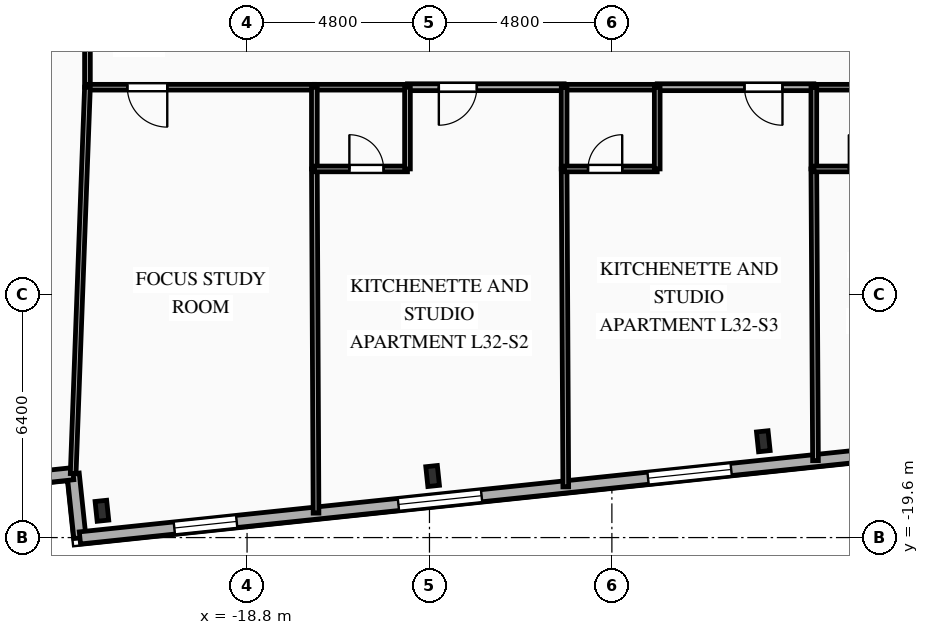
"""IFC4 building model, lengths in metres.
Left out: names, types, materials, properties, quantities, classifications, styles, units other than length and angle.
Written with IfcOpenShell. Run it as: python <this file> out.ifc"""

import sys

from ifc_helpers import new_model, si_unit, direction, frame, frame_2d, origin, origin_2d, place, context, subcontext, project, spatial, rectangle, i_section, extrude, element, fill, save


model = new_model("IFC4")
c1 = context("Model", 3, precision=1e-05, world=origin(), true_north=direction((0.0, 1.0)))
c2 = subcontext(c1, "Body", "Model", "MODEL_VIEW")
j1 = project(units=[si_unit("LENGTHUNIT", "METRE"), si_unit("PLANEANGLEUNIT", "RADIAN")], contexts=[c1])
p1 = place(None, origin())
s1 = spatial("IfcSite", under=j1, at=p1, CompositionType="ELEMENT")
p2 = place(p1, origin())
s2 = spatial("IfcBuilding", under=s1, at=p2, CompositionType="ELEMENT")
p3 = place(p2, frame((0.0, 0.0, 115.85)))
s3 = spatial("IfcBuildingStorey", under=s2, at=p3, CompositionType="ELEMENT", Elevation=115.85)
for number, where, z_axis, x_axis in (
    (1, (-22.619, -18.895, 0.0), (0.0, 0.0, 1.0), (0.995, 0.105, 0.0)),
    (2, (-13.917, -17.98, 0.0), (0.0, 0.0, 1.0), (0.995, 0.105, 0.0)),
    (3, (-5.215, -17.066, 0.0), (0.0, 0.0, 1.0), (0.995, 0.105, 0.0)),
):
    element("IfcColumn", number, at=place(p3, frame(where, z_axis=z_axis, x_axis=x_axis)), inside=s3, PredefinedType="COLUMN", context=c2, shape_type="SweptSolid", body=[
        extrude(i_section(OverallWidth=0.306, OverallDepth=0.524, WebThickness=0.021, FlangeThickness=0.04, FilletRadius=0.027, at=origin_2d()), origin(), (0.0, 0.0, 1.0), 3.35),
    ])
for number, where, z_axis, x_axis in (
    (4, (-23.198, -19.609, 0.0), (0.0, 0.0, 1.0), (-0.105, 0.995, 0.0)),
    (5, (-23.376, -17.919, 0.0), (0.0, 0.0, 1.0), (-0.995, -0.105, 0.0)),
):
    element("IfcWall", number, at=place(p3, frame(where, z_axis=z_axis, x_axis=x_axis)), inside=s3, PredefinedType="SOLIDWALL", context=c2, shape_type="SweptSolid", body=[
        extrude(rectangle(XDim=1.7, YDim=0.32, at=frame_2d((0.85, 0.0))), origin(), (0.0, 0.0, 1.0), 3.045),
    ])
p4 = place(p3, frame((30.307, -13.986, 0.0), z_axis=(0.0, 0.0, 1.0), x_axis=(-0.994521628355, -0.104531003701, 0.0)))
e6 = element("IfcWall", 6, at=p4, inside=s3, PredefinedType="SOLIDWALL", context=c2, shape_type="SweptSolid", body=[
    extrude(rectangle(XDim=53.8, YDim=0.32, at=frame_2d((26.9, 0.0))), origin(), (0.0, 0.0, 1.0), 3.045),
])
p5 = place(p4, frame((3.098, 0.0, 0.85)))
e7 = element("IfcOpeningElement", 7, at=p5, cuts=e6, PredefinedType="OPENING", context=c2, shape_type="SweptSolid", body=[
    extrude(rectangle(XDim=1.65, YDim=1.85, at=frame_2d((0.825, 0.925))), frame((0.0, 0.17, 0.0), z_axis=(0.0, -1.0, 0.0), x_axis=(1.0, 0.0, 0.0)), (0.0, 0.0, 1.0), 0.34),
])
p6 = place(p4, frame((10.143, 0.0, 0.85)))
e8 = element("IfcOpeningElement", 8, at=p6, cuts=e6, PredefinedType="OPENING", context=c2, shape_type="SweptSolid", body=[
    extrude(rectangle(XDim=1.65, YDim=1.85, at=frame_2d((0.825, 0.925))), frame((0.0, 0.17, 0.0), z_axis=(0.0, -1.0, 0.0), x_axis=(1.0, 0.0, 0.0)), (0.0, 0.0, 1.0), 0.34),
])
p7 = place(p4, frame((16.753, 0.0, 0.85)))
e9 = element("IfcOpeningElement", 9, at=p7, cuts=e6, PredefinedType="OPENING", context=c2, shape_type="SweptSolid", body=[
    extrude(rectangle(XDim=2.2, YDim=1.85, at=frame_2d((1.1, 0.925))), frame((0.0, 0.17, 0.0), z_axis=(0.0, -1.0, 0.0), x_axis=(1.0, 0.0, 0.0)), (0.0, 0.0, 1.0), 0.34),
])
p8 = place(p4, frame((23.358, 0.0, 0.85)))
e10 = element("IfcOpeningElement", 10, at=p8, cuts=e6, PredefinedType="OPENING", context=c2, shape_type="SweptSolid", body=[
    extrude(rectangle(XDim=2.2, YDim=1.85, at=frame_2d((1.1, 0.925))), frame((0.0, 0.17, 0.0), z_axis=(0.0, -1.0, 0.0), x_axis=(1.0, 0.0, 0.0)), (0.0, 0.0, 1.0), 0.34),
])
p9 = place(p4, frame((29.963, 0.0, 0.85)))
e11 = element("IfcOpeningElement", 11, at=p9, cuts=e6, PredefinedType="OPENING", context=c2, shape_type="SweptSolid", body=[
    extrude(rectangle(XDim=2.2, YDim=1.85, at=frame_2d((1.1, 0.925))), frame((0.0, 0.17, 0.0), z_axis=(0.0, -1.0, 0.0), x_axis=(1.0, 0.0, 0.0)), (0.0, 0.0, 1.0), 0.34),
])
p10 = place(p4, frame((36.568, 0.0, 0.85)))
e12 = element("IfcOpeningElement", 12, at=p10, cuts=e6, PredefinedType="OPENING", context=c2, shape_type="SweptSolid", body=[
    extrude(rectangle(XDim=2.2, YDim=1.85, at=frame_2d((1.1, 0.925))), frame((0.0, 0.17, 0.0), z_axis=(0.0, -1.0, 0.0), x_axis=(1.0, 0.0, 0.0)), (0.0, 0.0, 1.0), 0.34),
])
p11 = place(p4, frame((43.173, 0.0, 0.85)))
e13 = element("IfcOpeningElement", 13, at=p11, cuts=e6, PredefinedType="OPENING", context=c2, shape_type="SweptSolid", body=[
    extrude(rectangle(XDim=2.2, YDim=1.85, at=frame_2d((1.1, 0.925))), frame((0.0, 0.17, 0.0), z_axis=(0.0, -1.0, 0.0), x_axis=(1.0, 0.0, 0.0)), (0.0, 0.0, 1.0), 0.34),
])
p12 = place(p4, frame((49.653, 0.0, 0.85)))
e14 = element("IfcOpeningElement", 14, at=p12, cuts=e6, PredefinedType="OPENING", context=c2, shape_type="SweptSolid", body=[
    extrude(rectangle(XDim=1.65, YDim=1.85, at=frame_2d((0.825, 0.925))), frame((0.0, 0.17, 0.0), z_axis=(0.0, -1.0, 0.0), x_axis=(1.0, 0.0, 0.0)), (0.0, 0.0, 1.0), 0.34),
])
p13 = place(p3, frame((-23.0, -7.75, 0.0), z_axis=(0.0, 0.0, 1.0), x_axis=(0.0, 1.0, 0.0)))
e15 = element("IfcWall", 15, at=p13, inside=s3, PredefinedType="PARTITIONING", context=c2, shape_type="SweptSolid", body=[
    extrude(rectangle(XDim=2.15, YDim=0.15, at=frame_2d((1.075, 0.0))), origin(), (0.0, 0.0, 1.0), 2.7),
])
p14 = place(p3, frame((-17.029, -7.75, 0.0), z_axis=(0.0, 0.0, 1.0), x_axis=(-1.0, 0.0, 0.0)))
e16 = element("IfcWall", 16, at=p14, inside=s3, PredefinedType="PARTITIONING", context=c2, shape_type="SweptSolid", body=[
    extrude(rectangle(XDim=5.971, YDim=0.15, at=frame_2d((2.985, 0.0))), origin(), (0.0, 0.0, 1.0), 3.045),
])
p15 = place(p14, frame((3.871, 0.0, 0.0)))
e17 = element("IfcOpeningElement", 17, at=p15, cuts=e16, PredefinedType="OPENING", context=c2, shape_type="SweptSolid", body=[
    extrude(rectangle(XDim=1.05, YDim=2.15, at=frame_2d((0.525, 1.075))), frame((0.0, 0.085, 0.0), z_axis=(0.0, -1.0, 0.0), x_axis=(1.0, 0.0, 0.0)), (0.0, 0.0, 1.0), 0.17),
])
p16 = place(p3, frame((-10.457, -7.75, 0.0), z_axis=(0.0, 0.0, 1.0), x_axis=(-1.0, 0.0, 0.0)))
e18 = element("IfcWall", 18, at=p16, inside=s3, PredefinedType="PARTITIONING", context=c2, shape_type="SweptSolid", body=[
    extrude(rectangle(XDim=4.122, YDim=0.18, at=frame_2d((2.061, 0.0))), origin(), (0.0, 0.0, 1.0), 3.045),
])
p17 = place(p16, frame((2.297, 0.0, 0.0)))
e19 = element("IfcOpeningElement", 19, at=p17, cuts=e18, PredefinedType="OPENING", context=c2, shape_type="SweptSolid", body=[
    extrude(rectangle(XDim=1.0, YDim=2.15, at=frame_2d((0.5, 1.075))), frame((0.0, 0.1, 0.0), z_axis=(0.0, -1.0, 0.0), x_axis=(1.0, 0.0, 0.0)), (0.0, 0.0, 1.0), 0.2),
])
p18 = place(p3, frame((-14.579, -7.75, 0.0), z_axis=(0.0, 0.0, 1.0), x_axis=(-1.0, 0.0, 0.0)))
e20 = element("IfcWall", 20, at=p18, inside=s3, PredefinedType="PLUMBINGWALL", context=c2, shape_type="SweptSolid", body=[
    extrude(rectangle(XDim=2.45, YDim=0.15, at=frame_2d((1.225, 0.0))), origin(), (0.0, 0.0, 1.0), 3.045),
])
p19 = place(p3, frame((-3.886, -7.75, 0.0), z_axis=(0.0, 0.0, 1.0), x_axis=(-1.0, 0.0, 0.0)))
e21 = element("IfcWall", 21, at=p19, inside=s3, PredefinedType="PARTITIONING", context=c2, shape_type="SweptSolid", body=[
    extrude(rectangle(XDim=4.121, YDim=0.18, at=frame_2d((2.061, 0.0))), origin(), (0.0, 0.0, 1.0), 3.045),
])
p20 = place(p19, frame((0.825, 0.0, 0.0)))
e22 = element("IfcOpeningElement", 22, at=p20, cuts=e21, PredefinedType="OPENING", context=c2, shape_type="SweptSolid", body=[
    extrude(rectangle(XDim=1.0, YDim=2.15, at=frame_2d((0.5, 1.075))), frame((0.0, 0.1, 0.0), z_axis=(0.0, -1.0, 0.0), x_axis=(1.0, 0.0, 0.0)), (0.0, 0.0, 1.0), 0.2),
])
for number, where, z_axis, x_axis in (
    (23, (-8.007, -7.75, 0.0), (0.0, 0.0, 1.0), (-1.0, 0.0, 0.0)),
    (24, (-1.436, -7.75, 0.0), (0.0, 0.0, 1.0), (-1.0, 0.0, 0.0)),
):
    element("IfcWall", number, at=place(p3, frame(where, z_axis=z_axis, x_axis=x_axis)), inside=s3, PredefinedType="PLUMBINGWALL", context=c2, shape_type="SweptSolid", body=[
        extrude(rectangle(XDim=2.45, YDim=0.15, at=frame_2d((1.225, 0.0))), origin(), (0.0, 0.0, 1.0), 3.045),
    ])
p21 = place(p3, frame((-23.0, -7.75, 0.0), z_axis=(0.0, 0.0, 1.0), x_axis=(-0.036924695214, -0.999318050914, 0.0)))
e25 = element("IfcWall", 25, at=p21, inside=s3, PredefinedType="PARTITIONING", context=c2, shape_type="SweptSolid", body=[
    extrude(rectangle(XDim=10.176, YDim=0.15, at=frame_2d((5.088, 0.0))), origin(), (0.0, 0.0, 1.0), 3.045),
])
p22 = place(p3, frame((-17.029, -9.9, 0.0), z_axis=(0.0, 0.0, 1.0), x_axis=(0.004852348859, -0.999988227286, 0.0)))
e26 = element("IfcWall", 26, at=p22, inside=s3, PredefinedType="PARTITIONING", context=c2, shape_type="SweptSolid", body=[
    extrude(rectangle(XDim=9.056, YDim=0.15, at=frame_2d((4.528, 0.0))), origin(), (0.0, 0.0, 1.0), 3.045),
])
p23 = place(p3, frame((-17.029, -7.75, 0.0), z_axis=(0.0, 0.0, 1.0), x_axis=(0.0, -1.0, 0.0)))
e27 = element("IfcWall", 27, at=p23, inside=s3, PredefinedType="PLUMBINGWALL", context=c2, shape_type="SweptSolid", body=[
    extrude(rectangle(XDim=2.15, YDim=0.15, at=frame_2d((1.075, 0.0))), origin(), (0.0, 0.0, 1.0), 3.045),
])
p24 = place(p3, frame((-17.029, -9.9, 0.0), z_axis=(0.0, 0.0, 1.0), x_axis=(1.0, 0.0, 0.0)))
e28 = element("IfcWall", 28, at=p24, inside=s3, PredefinedType="PLUMBINGWALL", context=c2, shape_type="SweptSolid", body=[
    extrude(rectangle(XDim=2.45, YDim=0.15, at=frame_2d((1.225, 0.0))), origin(), (0.0, 0.0, 1.0), 3.045),
])
p25 = place(p24, frame((0.921, 0.0, 0.0)))
e29 = element("IfcOpeningElement", 29, at=p25, cuts=e28, PredefinedType="OPENING", context=c2, shape_type="SweptSolid", body=[
    extrude(rectangle(XDim=0.9, YDim=2.1, at=frame_2d((0.45, 1.05))), frame((0.0, 0.085, 0.0), z_axis=(0.0, -1.0, 0.0), x_axis=(1.0, 0.0, 0.0)), (0.0, 0.0, 1.0), 0.17),
])
p26 = place(p3, frame((-14.579, -9.9, 0.0), z_axis=(0.0, 0.0, 1.0), x_axis=(0.0, 1.0, 0.0)))
e30 = element("IfcWall", 30, at=p26, inside=s3, PredefinedType="PLUMBINGWALL", context=c2, shape_type="SweptSolid", body=[
    extrude(rectangle(XDim=2.15, YDim=0.15, at=frame_2d((1.075, 0.0))), origin(), (0.0, 0.0, 1.0), 3.045),
])
p27 = place(p3, frame((-10.457, -9.9, 0.0), z_axis=(0.0, 0.0, 1.0), x_axis=(0.005252948012, -0.999986203173, 0.0)))
e31 = element("IfcWall", 31, at=p27, inside=s3, PredefinedType="PARTITIONING", context=c2, shape_type="SweptSolid", body=[
    extrude(rectangle(XDim=8.366, YDim=0.15, at=frame_2d((4.183, 0.0))), origin(), (0.0, 0.0, 1.0), 3.045),
])
p28 = place(p3, frame((-10.457, -7.75, 0.0), z_axis=(0.0, 0.0, 1.0), x_axis=(0.0, -1.0, 0.0)))
e32 = element("IfcWall", 32, at=p28, inside=s3, PredefinedType="PLUMBINGWALL", context=c2, shape_type="SweptSolid", body=[
    extrude(rectangle(XDim=2.15, YDim=0.15, at=frame_2d((1.075, 0.0))), origin(), (0.0, 0.0, 1.0), 3.045),
])
p29 = place(p3, frame((-10.457, -9.9, 0.0), z_axis=(0.0, 0.0, 1.0), x_axis=(1.0, 0.0, 0.0)))
e33 = element("IfcWall", 33, at=p29, inside=s3, PredefinedType="PLUMBINGWALL", context=c2, shape_type="SweptSolid", body=[
    extrude(rectangle(XDim=2.45, YDim=0.15, at=frame_2d((1.225, 0.0))), origin(), (0.0, 0.0, 1.0), 3.045),
])
p30 = place(p29, frame((0.629, 0.0, 0.0)))
e34 = element("IfcOpeningElement", 34, at=p30, cuts=e33, PredefinedType="OPENING", context=c2, shape_type="SweptSolid", body=[
    extrude(rectangle(XDim=0.9, YDim=2.1, at=frame_2d((0.45, 1.05))), frame((0.0, 0.085, 0.0), z_axis=(0.0, -1.0, 0.0), x_axis=(1.0, 0.0, 0.0)), (0.0, 0.0, 1.0), 0.17),
])
p31 = place(p3, frame((-8.007, -9.9, 0.0), z_axis=(0.0, 0.0, 1.0), x_axis=(0.0, 1.0, 0.0)))
e35 = element("IfcWall", 35, at=p31, inside=s3, PredefinedType="PLUMBINGWALL", context=c2, shape_type="SweptSolid", body=[
    extrude(rectangle(XDim=2.15, YDim=0.15, at=frame_2d((1.075, 0.0))), origin(), (0.0, 0.0, 1.0), 3.045),
])
p32 = place(p3, frame((-3.886, -9.9, 0.0), z_axis=(0.0, 0.0, 1.0), x_axis=(0.005725643334, -0.99998360837, 0.0)))
e36 = element("IfcWall", 36, at=p32, inside=s3, PredefinedType="PARTITIONING", context=c2, shape_type="SweptSolid", body=[
    extrude(rectangle(XDim=7.675, YDim=0.15, at=frame_2d((3.838, 0.0))), origin(), (0.0, 0.0, 1.0), 3.045),
])
p33 = place(p3, frame((-3.886, -7.75, 0.0), z_axis=(0.0, 0.0, 1.0), x_axis=(0.0, -1.0, 0.0)))
e37 = element("IfcWall", 37, at=p33, inside=s3, PredefinedType="PLUMBINGWALL", context=c2, shape_type="SweptSolid", body=[
    extrude(rectangle(XDim=2.15, YDim=0.15, at=frame_2d((1.075, 0.0))), origin(), (0.0, 0.0, 1.0), 3.045),
])
p34 = place(p3, frame((-3.886, -9.9, 0.0), z_axis=(0.0, 0.0, 1.0), x_axis=(1.0, 0.0, 0.0)))
e38 = element("IfcWall", 38, at=p34, inside=s3, PredefinedType="PLUMBINGWALL", context=c2, shape_type="SweptSolid", body=[
    extrude(rectangle(XDim=2.45, YDim=0.15, at=frame_2d((1.225, 0.0))), origin(), (0.0, 0.0, 1.0), 3.045),
])
p35 = place(p34, frame((0.921, 0.0, 0.0)))
e39 = element("IfcOpeningElement", 39, at=p35, cuts=e38, PredefinedType="OPENING", context=c2, shape_type="SweptSolid", body=[
    extrude(rectangle(XDim=0.9, YDim=2.1, at=frame_2d((0.45, 1.05))), frame((0.0, 0.085, 0.0), z_axis=(0.0, -1.0, 0.0), x_axis=(1.0, 0.0, 0.0)), (0.0, 0.0, 1.0), 0.17),
])
p36 = place(p10, origin())
e40 = element("IfcWindow", 40, at=p36, inside=s3, PartitioningType="SINGLE_PANEL", PredefinedType="WINDOW", context=c2, shape_type="SweptSolid", body=[
    extrude(rectangle(XDim=2.2, YDim=1.85, at=frame_2d((1.1, 0.925))), frame((0.0, 0.03, 0.0), z_axis=(0.0, -1.0, 0.0), x_axis=(1.0, 0.0, 0.0)), (0.0, 0.0, 1.0), 0.06),
])
fill(e12, e40)
p37 = place(p11, origin())
e41 = element("IfcWindow", 41, at=p37, inside=s3, PartitioningType="SINGLE_PANEL", PredefinedType="WINDOW", context=c2, shape_type="SweptSolid", body=[
    extrude(rectangle(XDim=2.2, YDim=1.85, at=frame_2d((1.1, 0.925))), frame((0.0, 0.03, 0.0), z_axis=(0.0, -1.0, 0.0), x_axis=(1.0, 0.0, 0.0)), (0.0, 0.0, 1.0), 0.06),
])
fill(e13, e41)
p38 = place(p12, origin())
e42 = element("IfcWindow", 42, at=p38, inside=s3, PartitioningType="SINGLE_PANEL", PredefinedType="WINDOW", context=c2, shape_type="SweptSolid", body=[
    extrude(rectangle(XDim=1.65, YDim=1.85, at=frame_2d((0.825, 0.925))), frame((0.0, 0.03, 0.0), z_axis=(0.0, -1.0, 0.0), x_axis=(1.0, 0.0, 0.0)), (0.0, 0.0, 1.0), 0.06),
])
fill(e14, e42)
p39 = place(p15, origin())
e43 = element("IfcDoor", 43, at=p39, inside=s3, OperationType="SINGLE_SWING_LEFT", PredefinedType="DOOR", context=c2, shape_type="SweptSolid", body=[
    extrude(rectangle(XDim=1.05, YDim=2.15, at=frame_2d((0.525, 1.075))), frame((0.0, 0.025, 0.0), z_axis=(0.0, -1.0, 0.0), x_axis=(1.0, 0.0, 0.0)), (0.0, 0.0, 1.0), 0.05),
])
fill(e17, e43)
p40 = place(p17, origin())
e44 = element("IfcDoor", 44, at=p40, inside=s3, OperationType="SINGLE_SWING_RIGHT", PredefinedType="DOOR", context=c2, shape_type="SweptSolid", body=[
    extrude(rectangle(XDim=1.0, YDim=2.15, at=frame_2d((0.5, 1.075))), frame((0.0, 0.025, 0.0), z_axis=(0.0, -1.0, 0.0), x_axis=(1.0, 0.0, 0.0)), (0.0, 0.0, 1.0), 0.05),
])
fill(e19, e44)
p41 = place(p20, origin())
e45 = element("IfcDoor", 45, at=p41, inside=s3, OperationType="SINGLE_SWING_LEFT", PredefinedType="DOOR", context=c2, shape_type="SweptSolid", body=[
    extrude(rectangle(XDim=1.0, YDim=2.15, at=frame_2d((0.5, 1.075))), frame((0.0, 0.025, 0.0), z_axis=(0.0, -1.0, 0.0), x_axis=(1.0, 0.0, 0.0)), (0.0, 0.0, 1.0), 0.05),
])
fill(e22, e45)
p42 = place(p25, origin())
e46 = element("IfcDoor", 46, at=p42, inside=s3, OperationType="SINGLE_SWING_LEFT", PredefinedType="DOOR", context=c2, shape_type="SweptSolid", body=[
    extrude(rectangle(XDim=0.9, YDim=2.1, at=frame_2d((0.45, 1.05))), frame((0.0, 0.025, 0.0), z_axis=(0.0, -1.0, 0.0), x_axis=(1.0, 0.0, 0.0)), (0.0, 0.0, 1.0), 0.05),
])
fill(e29, e46)
p43 = place(p30, origin())
e47 = element("IfcDoor", 47, at=p43, inside=s3, OperationType="SINGLE_SWING_RIGHT", PredefinedType="DOOR", context=c2, shape_type="SweptSolid", body=[
    extrude(rectangle(XDim=0.9, YDim=2.1, at=frame_2d((0.45, 1.05))), frame((0.0, 0.025, 0.0), z_axis=(0.0, -1.0, 0.0), x_axis=(1.0, 0.0, 0.0)), (0.0, 0.0, 1.0), 0.05),
])
fill(e34, e47)
p44 = place(p35, origin())
e48 = element("IfcDoor", 48, at=p44, inside=s3, OperationType="SINGLE_SWING_LEFT", PredefinedType="DOOR", context=c2, shape_type="SweptSolid", body=[
    extrude(rectangle(XDim=0.9, YDim=2.1, at=frame_2d((0.45, 1.05))), frame((0.0, 0.025, 0.0), z_axis=(0.0, -1.0, 0.0), x_axis=(1.0, 0.0, 0.0)), (0.0, 0.0, 1.0), 0.05),
])
fill(e39, e48)
save(model, sys.argv[1])
